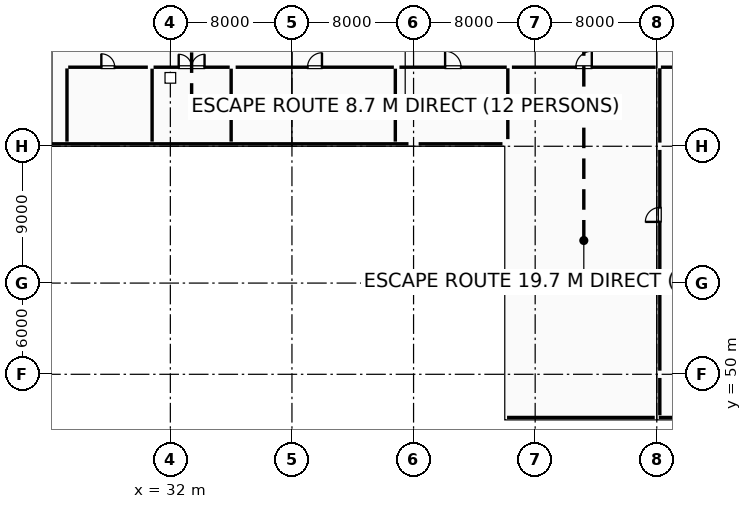
"""IFC4 building model, lengths in metres.
Left out: names, types, materials, properties, quantities, classifications, styles, units other than length and angle.
Written with IfcOpenShell. Run it as: python <this file> out.ifc"""

import sys

from ifc_helpers import new_model, si_unit, direction, frame, frame_2d, origin, origin_2d, place, context, subcontext, project, spatial, rectangle, hollow_rectangle, i_section, extrude, element, fill, save


model = new_model("IFC4")
c1 = context("Model", 3, precision=1e-05, world=origin(), true_north=direction((0.0, 1.0)))
c2 = subcontext(c1, "Body", "Model", "MODEL_VIEW")
j1 = project(units=[si_unit("LENGTHUNIT", "METRE"), si_unit("PLANEANGLEUNIT", "RADIAN")], contexts=[c1])
p1 = place(None, origin())
s1 = spatial("IfcSite", under=j1, at=p1, CompositionType="ELEMENT")
p2 = place(p1, origin())
s2 = spatial("IfcBuilding", under=s1, at=p2, CompositionType="ELEMENT")
p3 = place(p2, frame((0.0, 0.0, 24.3)))
s3 = spatial("IfcBuildingStorey", under=s2, at=p3, CompositionType="ELEMENT", Elevation=24.3)
p4 = place(p3, frame((48.0, 65.0, 0.0), z_axis=(0.0, 0.0, 1.0), x_axis=(1.0, 0.0, 0.0)))
e1 = element("IfcColumn", 1, at=p4, inside=s3, PredefinedType="COLUMN", context=c2, shape_type="SweptSolid", body=[
    extrude(rectangle(XDim=0.65, YDim=0.65, at=origin_2d()), origin(), (0.0, 0.0, 1.0), 4.46),
])
for number, where, z_axis, x_axis in (
    (2, (56.0, 50.0, 0.0), (0.0, 0.0, 1.0), (1.0, 0.0, 0.0)),
    (3, (56.0, 56.0, 0.0), (0.0, 0.0, 1.0), (1.0, 0.0, 0.0)),
    (4, (56.0, 65.0, 0.0), (0.0, 0.0, 1.0), (1.0, 0.0, 0.0)),
):
    element("IfcColumn", number, at=place(p3, frame(where, z_axis=z_axis, x_axis=x_axis)), inside=s3, PredefinedType="COLUMN", context=c2, shape_type="SweptSolid", body=[
        extrude(rectangle(XDim=0.9, YDim=0.9, at=origin_2d()), origin(), (0.0, 0.0, 1.0), 4.46),
    ])
p5 = place(p3, frame((64.0, 50.0, 0.0), z_axis=(0.0, 0.0, 1.0), x_axis=(1.0, 0.0, 0.0)))
e5 = element("IfcColumn", 5, at=p5, inside=s3, PredefinedType="COLUMN", context=c2, shape_type="SweptSolid", body=[
    extrude(hollow_rectangle(XDim=0.45, YDim=0.45, WallThickness=0.02, at=origin_2d()), origin(), (0.0, 0.0, 1.0), 4.5),
])
for number, where, z_axis, x_axis in (
    (6, (64.0, 56.0, 0.0), (0.0, 0.0, 1.0), (1.0, 0.0, 0.0)),
    (7, (64.0, 65.0, 0.0), (0.0, 0.0, 1.0), (1.0, 0.0, 0.0)),
    (8, (64.0, 47.0, 0.0), (0.0, 0.0, 1.0), (1.0, 0.0, 0.0)),
):
    element("IfcColumn", number, at=place(p3, frame(where, z_axis=z_axis, x_axis=x_axis)), inside=s3, PredefinedType="COLUMN", context=c2, shape_type="SweptSolid", body=[
        extrude(i_section(OverallWidth=0.25, OverallDepth=0.45, WebThickness=0.011, FlangeThickness=0.014, FilletRadius=0.015, at=origin_2d()), origin(), (0.0, 0.0, 1.0), 4.5),
    ])
p6 = place(p3, frame((71.667, 47.16, 0.0), z_axis=(0.0, 0.0, 1.0), x_axis=(-1.0, 0.0, 0.0)))
e9 = element("IfcWall", 9, at=p6, inside=s3, PredefinedType="STANDARD", context=c2, shape_type="SweptSolid", body=[
    extrude(rectangle(XDim=7.534, YDim=0.28, at=frame_2d((3.767, 0.0))), origin(), (0.0, 0.0, 1.0), 1.25),
])
p7 = place(p3, frame((63.867, 47.16, 0.0), z_axis=(0.0, 0.0, 1.0), x_axis=(-1.0, 0.0, 0.0)))
e10 = element("IfcWall", 10, at=p7, inside=s3, PredefinedType="STANDARD", context=c2, shape_type="SweptSolid", body=[
    extrude(rectangle(XDim=9.717, YDim=0.28, at=frame_2d((4.858, 0.0))), origin(), (0.0, 0.0, 1.0), 4.28),
])
p8 = place(p3, frame((53.85, 65.16, 0.0), z_axis=(0.0, 0.0, 1.0), x_axis=(-1.0, 0.0, 0.0)))
e11 = element("IfcWall", 11, at=p8, inside=s3, PredefinedType="STANDARD", context=c2, shape_type="SweptSolid", body=[
    extrude(rectangle(XDim=5.517, YDim=0.28, at=frame_2d((2.759, 0.0))), origin(), (0.0, 0.0, 1.0), 3.965),
])
p9 = place(p8, frame((2.209, 0.0, 0.95)))
e12 = element("IfcOpeningElement", 12, at=p9, cuts=e11, PredefinedType="OPENING", context=c2, shape_type="SweptSolid", body=[
    extrude(rectangle(XDim=1.1, YDim=1.8, at=frame_2d((0.55, 0.9))), frame((0.0, 0.15, 0.0), z_axis=(0.0, -1.0, 0.0), x_axis=(1.0, 0.0, 0.0)), (0.0, 0.0, 1.0), 0.3),
])
p10 = place(p3, frame((47.667, 65.16, 0.0), z_axis=(0.0, 0.0, 1.0), x_axis=(-1.0, 0.0, 0.0)))
e13 = element("IfcWall", 13, at=p10, inside=s3, PredefinedType="STANDARD", context=c2, shape_type="SweptSolid", body=[
    extrude(rectangle(XDim=23.517, YDim=0.28, at=frame_2d((11.759, 0.0))), origin(), (0.0, 0.0, 1.0), 4.28),
])
p11 = place(p3, frame((24.14, 65.13, 0.0), z_axis=(0.0, 0.0, 1.0), x_axis=(0.0, 1.0, 0.0)))
e14 = element("IfcWall", 14, at=p11, inside=s3, PredefinedType="ELEMENTEDWALL", context=c2, shape_type="SweptSolid", body=[
    extrude(rectangle(XDim=17.537, YDim=0.24, at=frame_2d((8.769, 0.0))), origin(), (0.0, 0.0, 1.0), 4.28),
])
p12 = place(p3, frame((64.27, 70.2, 0.0), z_axis=(0.0, 0.0, 1.0), x_axis=(1.0, 0.0, 0.0)))
e15 = element("IfcWall", 15, at=p12, inside=s3, PredefinedType="PARTITIONING", context=c2, shape_type="SweptSolid", body=[
    extrude(rectangle(XDim=32.46, YDim=0.1, at=frame_2d((16.23, 0.0))), origin(), (0.0, 0.0, 1.0), 4.5),
])
p13 = place(p12, frame((15.755, 0.0, 0.0)))
e16 = element("IfcOpeningElement", 16, at=p13, cuts=e15, PredefinedType="OPENING", context=c2, shape_type="SweptSolid", body=[
    extrude(rectangle(XDim=0.95, YDim=2.15, at=frame_2d((0.475, 1.075))), frame((0.0, 0.06, 0.0), z_axis=(0.0, -1.0, 0.0), x_axis=(1.0, 0.0, 0.0)), (0.0, 0.0, 1.0), 0.12),
])
p14 = place(p3, frame((64.2, 47.304, 0.0), z_axis=(0.0, 0.0, 1.0), x_axis=(0.0, 1.0, 0.0)))
e17 = element("IfcWall", 17, at=p14, inside=s3, PredefinedType="PARTITIONING", context=c2, shape_type="SweptSolid", body=[
    extrude(rectangle(XDim=2.456, YDim=0.1, at=frame_2d((1.228, 0.0))), origin(), (0.0, 0.0, 1.0), 3.51),
])
p15 = place(p3, frame((64.2, 50.24, 0.0), z_axis=(0.0, 0.0, 1.0), x_axis=(0.0, 1.0, 0.0)))
e18 = element("IfcWall", 18, at=p15, inside=s3, PredefinedType="PARTITIONING", context=c2, shape_type="SweptSolid", body=[
    extrude(rectangle(XDim=5.52, YDim=0.1, at=frame_2d((2.76, 0.0))), origin(), (0.0, 0.0, 1.0), 3.61),
])
p16 = place(p3, frame((64.2, 56.24, 0.0), z_axis=(0.0, 0.0, 1.0), x_axis=(0.0, 1.0, 0.0)))
e19 = element("IfcWall", 19, at=p16, inside=s3, PredefinedType="PARTITIONING", context=c2, shape_type="SweptSolid", body=[
    extrude(rectangle(XDim=8.52, YDim=0.1, at=frame_2d((4.26, 0.0))), origin(), (0.0, 0.0, 1.0), 3.81),
])
p17 = place(p16, frame((3.785, 0.0, 0.0)))
e20 = element("IfcOpeningElement", 20, at=p17, cuts=e19, PredefinedType="OPENING", context=c2, shape_type="SweptSolid", body=[
    extrude(rectangle(XDim=0.95, YDim=2.15, at=frame_2d((0.475, 1.075))), frame((0.0, 0.06, 0.0), z_axis=(0.0, -1.0, 0.0), x_axis=(1.0, 0.0, 0.0)), (0.0, 0.0, 1.0), 0.12),
])
p18 = place(p3, frame((64.2, 65.24, 0.0), z_axis=(0.0, 0.0, 1.0), x_axis=(0.0, 1.0, 0.0)))
e21 = element("IfcWall", 21, at=p18, inside=s3, PredefinedType="PARTITIONING", context=c2, shape_type="SweptSolid", body=[
    extrude(rectangle(XDim=4.89, YDim=0.1, at=frame_2d((2.445, 0.0))), origin(), (0.0, 0.0, 1.0), 3.66),
])
p19 = place(p3, frame((54.47, 70.2, 0.0), z_axis=(0.0, 0.0, 1.0), x_axis=(1.0, 0.0, 0.0)))
e22 = element("IfcWall", 22, at=p19, inside=s3, PredefinedType="PARTITIONING", context=c2, shape_type="SweptSolid", body=[
    extrude(rectangle(XDim=9.46, YDim=0.1, at=frame_2d((4.73, 0.0))), origin(), (0.0, 0.0, 1.0), 4.27),
])
p20 = place(p19, frame((4.205, 0.0, 0.0)))
e23 = element("IfcOpeningElement", 23, at=p20, cuts=e22, PredefinedType="OPENING", context=c2, shape_type="SweptSolid", body=[
    extrude(rectangle(XDim=1.05, YDim=2.15, at=frame_2d((0.525, 1.075))), frame((0.0, 0.06, 0.0), z_axis=(0.0, -1.0, 0.0), x_axis=(1.0, 0.0, 0.0)), (0.0, 0.0, 1.0), 0.12),
])
for number, where, z_axis, x_axis in (
    (24, (36.0, 70.105, 0.0), (0.0, 0.0, 1.0), (0.0, -1.0, 0.0)),
    (25, (30.8, 65.304, 0.0), (0.0, 0.0, 1.0), (0.0, 1.0, 0.0)),
):
    element("IfcWall", number, at=place(p3, frame(where, z_axis=z_axis, x_axis=x_axis)), inside=s3, PredefinedType="PARTITIONING", context=c2, shape_type="SweptSolid", body=[
        extrude(rectangle(XDim=4.801, YDim=0.15, at=frame_2d((2.4, 0.0))), origin(), (0.0, 0.0, 1.0), 4.27),
    ])
p21 = place(p3, frame((30.895, 70.2, 0.0), z_axis=(0.0, 0.0, 1.0), x_axis=(1.0, 0.0, 0.0)))
e26 = element("IfcWall", 26, at=p21, inside=s3, PredefinedType="PARTITIONING", context=c2, shape_type="SweptSolid", body=[
    extrude(rectangle(XDim=5.01, YDim=0.15, at=frame_2d((2.505, 0.0))), origin(), (0.0, 0.0, 1.0), 4.27),
])
p22 = place(p21, frame((1.655, 0.0, 0.0)))
e27 = element("IfcOpeningElement", 27, at=p22, cuts=e26, PredefinedType="OPENING", context=c2, shape_type="SweptSolid", body=[
    extrude(rectangle(XDim=1.7, YDim=2.25, at=frame_2d((0.85, 1.125))), frame((0.0, 0.085, 0.0), z_axis=(0.0, -1.0, 0.0), x_axis=(1.0, 0.0, 0.0)), (0.0, 0.0, 1.0), 0.17),
])
p23 = place(p3, frame((36.295, 70.2, 0.0), z_axis=(0.0, 0.0, 1.0), x_axis=(1.0, 0.0, 0.0)))
e28 = element("IfcWall", 28, at=p23, inside=s3, PredefinedType="PARTITIONING", context=c2, shape_type="SweptSolid", body=[
    extrude(rectangle(XDim=10.41, YDim=0.15, at=frame_2d((5.205, 0.0))), origin(), (0.0, 0.0, 1.0), 4.27),
])
p24 = place(p23, frame((4.73, 0.0, 0.0)))
e29 = element("IfcOpeningElement", 29, at=p24, cuts=e28, PredefinedType="OPENING", context=c2, shape_type="SweptSolid", body=[
    extrude(rectangle(XDim=0.95, YDim=2.15, at=frame_2d((0.475, 1.075))), frame((0.0, 0.085, 0.0), z_axis=(0.0, -1.0, 0.0), x_axis=(1.0, 0.0, 0.0)), (0.0, 0.0, 1.0), 0.17),
])
p25 = place(p3, frame((46.8, 70.105, 0.0), z_axis=(0.0, 0.0, 1.0), x_axis=(0.0, -1.0, 0.0)))
e30 = element("IfcWall", 30, at=p25, inside=s3, PredefinedType="PARTITIONING", context=c2, shape_type="SweptSolid", body=[
    extrude(rectangle(XDim=4.801, YDim=0.15, at=frame_2d((2.4, 0.0))), origin(), (0.0, 0.0, 1.0), 4.27),
])
p26 = place(p3, frame((47.07, 70.2, 0.0), z_axis=(0.0, 0.0, 1.0), x_axis=(1.0, 0.0, 0.0)))
e31 = element("IfcWall", 31, at=p26, inside=s3, PredefinedType="PARTITIONING", context=c2, shape_type="SweptSolid", body=[
    extrude(rectangle(XDim=7.06, YDim=0.1, at=frame_2d((3.53, 0.0))), origin(), (0.0, 0.0, 1.0), 4.27),
])
p27 = place(p26, frame((3.005, 0.0, 0.0)))
e32 = element("IfcOpeningElement", 32, at=p27, cuts=e31, PredefinedType="OPENING", context=c2, shape_type="SweptSolid", body=[
    extrude(rectangle(XDim=1.05, YDim=2.15, at=frame_2d((0.525, 1.075))), frame((0.0, 0.06, 0.0), z_axis=(0.0, -1.0, 0.0), x_axis=(1.0, 0.0, 0.0)), (0.0, 0.0, 1.0), 0.12),
])
p28 = place(p3, frame((54.2, 70.13, 0.0), z_axis=(0.0, 0.0, 1.0), x_axis=(0.0, -1.0, 0.0)))
e33 = element("IfcWall", 33, at=p28, inside=s3, PredefinedType="PARTITIONING", context=c2, shape_type="SweptSolid", body=[
    extrude(rectangle(XDim=4.66, YDim=0.1, at=frame_2d((2.33, 0.0))), origin(), (0.0, 0.0, 1.0), 4.27),
])
p29 = place(p3, frame((25.2, 65.304, 0.0), z_axis=(0.0, 0.0, 1.0), x_axis=(0.0, 1.0, 0.0)))
e34 = element("IfcWall", 34, at=p29, inside=s3, PredefinedType="PARTITIONING", context=c2, shape_type="SweptSolid", body=[
    extrude(rectangle(XDim=4.816, YDim=0.12, at=frame_2d((2.408, 0.0))), origin(), (0.0, 0.0, 1.0), 4.27),
])
p30 = place(p3, frame((25.28, 70.2, 0.0), z_axis=(0.0, 0.0, 1.0), x_axis=(1.0, 0.0, 0.0)))
e35 = element("IfcWall", 35, at=p30, inside=s3, PredefinedType="PARTITIONING", context=c2, shape_type="SweptSolid", body=[
    extrude(rectangle(XDim=5.24, YDim=0.12, at=frame_2d((2.62, 0.0))), origin(), (0.0, 0.0, 1.0), 4.27),
])
p31 = place(p30, frame((2.18, 0.0, 0.0)))
e36 = element("IfcOpeningElement", 36, at=p31, cuts=e35, PredefinedType="OPENING", context=c2, shape_type="SweptSolid", body=[
    extrude(rectangle(XDim=0.88, YDim=2.1, at=frame_2d((0.44, 1.05))), frame((0.0, 0.07, 0.0), z_axis=(0.0, -1.0, 0.0), x_axis=(1.0, 0.0, 0.0)), (0.0, 0.0, 1.0), 0.14),
])
p32 = place(p9, origin())
e37 = element("IfcWindow", 37, at=p32, inside=s3, PartitioningType="SINGLE_PANEL", PredefinedType="WINDOW", context=c2, shape_type="SweptSolid", body=[
    extrude(rectangle(XDim=1.1, YDim=1.8, at=frame_2d((0.55, 0.9))), frame((0.0, 0.03, 0.0), z_axis=(0.0, -1.0, 0.0), x_axis=(1.0, 0.0, 0.0)), (0.0, 0.0, 1.0), 0.06),
])
fill(e12, e37)
p33 = place(p20, origin())
e38 = element("IfcDoor", 38, at=p33, inside=s3, OperationType="SINGLE_SWING_RIGHT", PredefinedType="DOOR", context=c2, shape_type="SweptSolid", body=[
    extrude(rectangle(XDim=1.05, YDim=2.15, at=frame_2d((0.525, 1.075))), frame((0.0, 0.025, 0.0), z_axis=(0.0, -1.0, 0.0), x_axis=(1.0, 0.0, 0.0)), (0.0, 0.0, 1.0), 0.05),
])
fill(e23, e38)
p34 = place(p17, origin())
e39 = element("IfcDoor", 39, at=p34, inside=s3, OperationType="SINGLE_SWING_LEFT", PredefinedType="DOOR", context=c2, shape_type="SweptSolid", body=[
    extrude(rectangle(XDim=0.95, YDim=2.15, at=frame_2d((0.475, 1.075))), frame((0.0, 0.025, 0.0), z_axis=(0.0, -1.0, 0.0), x_axis=(1.0, 0.0, 0.0)), (0.0, 0.0, 1.0), 0.05),
])
fill(e20, e39)
p35 = place(p22, origin())
e40 = element("IfcDoor", 40, at=p35, inside=s3, OperationType="DOUBLE_DOOR_SINGLE_SWING", PredefinedType="DOOR", context=c2, shape_type="SweptSolid", body=[
    extrude(rectangle(XDim=1.7, YDim=2.25, at=frame_2d((0.85, 1.125))), frame((0.0, 0.025, 0.0), z_axis=(0.0, -1.0, 0.0), x_axis=(1.0, 0.0, 0.0)), (0.0, 0.0, 1.0), 0.05),
])
fill(e27, e40)
p36 = place(p24, origin())
e41 = element("IfcDoor", 41, at=p36, inside=s3, OperationType="SINGLE_SWING_RIGHT", PredefinedType="DOOR", context=c2, shape_type="SweptSolid", body=[
    extrude(rectangle(XDim=0.95, YDim=2.15, at=frame_2d((0.475, 1.075))), frame((0.0, 0.025, 0.0), z_axis=(0.0, -1.0, 0.0), x_axis=(1.0, 0.0, 0.0)), (0.0, 0.0, 1.0), 0.05),
])
fill(e29, e41)
p37 = place(p27, origin())
e42 = element("IfcDoor", 42, at=p37, inside=s3, OperationType="SINGLE_SWING_LEFT", PredefinedType="DOOR", context=c2, shape_type="SweptSolid", body=[
    extrude(rectangle(XDim=1.05, YDim=2.15, at=frame_2d((0.525, 1.075))), frame((0.0, 0.025, 0.0), z_axis=(0.0, -1.0, 0.0), x_axis=(1.0, 0.0, 0.0)), (0.0, 0.0, 1.0), 0.05),
])
fill(e32, e42)
p38 = place(p31, origin())
e43 = element("IfcDoor", 43, at=p38, inside=s3, OperationType="SINGLE_SWING_LEFT", PredefinedType="DOOR", context=c2, shape_type="SweptSolid", body=[
    extrude(rectangle(XDim=0.88, YDim=2.1, at=frame_2d((0.44, 1.05))), frame((0.0, 0.025, 0.0), z_axis=(0.0, -1.0, 0.0), x_axis=(1.0, 0.0, 0.0)), (0.0, 0.0, 1.0), 0.05),
])
fill(e36, e43)
save(model, sys.argv[1])
